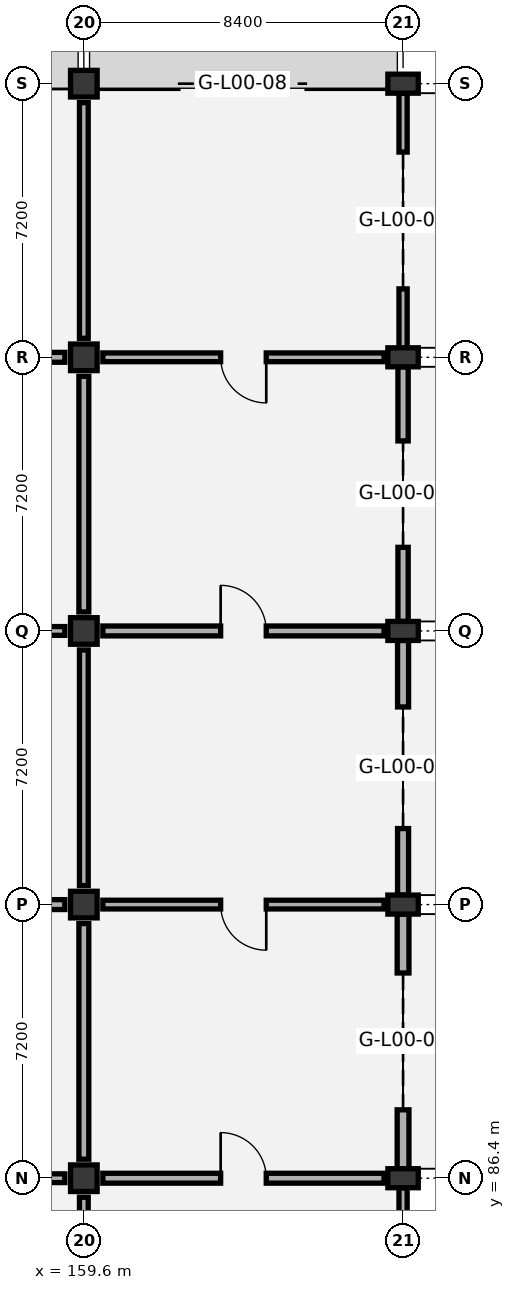
"""IFC4 building model, lengths in metres.
Left out: names, types, materials, properties, quantities, classifications, styles, units other than length and angle.
Written with IfcOpenShell. Run it as: python <this file> out.ifc"""

import sys

from ifc_helpers import new_model, si_unit, direction, frame, frame_2d, origin, origin_2d, place, context, subcontext, project, spatial, rectangle, extrude, element, fill, save


model = new_model("IFC4")
c1 = context("Model", 3, precision=1e-05, world=origin(), true_north=direction((0.0, 1.0)))
c2 = subcontext(c1, "Body", "Model", "MODEL_VIEW")
j1 = project(units=[si_unit("LENGTHUNIT", "METRE"), si_unit("PLANEANGLEUNIT", "RADIAN")], contexts=[c1])
p1 = place(None, origin())
s1 = spatial("IfcSite", under=j1, at=p1, CompositionType="ELEMENT")
p2 = place(p1, origin())
s2 = spatial("IfcBuilding", under=s1, at=p2, CompositionType="ELEMENT")
p3 = place(p2, origin())
s3 = spatial("IfcBuildingStorey", under=s2, at=p3, CompositionType="ELEMENT", Elevation=0.0)
for number, where, z_axis, x_axis in (
    (1, (159.6, 86.4, 0.0), (0.0, 0.0, 1.0), (1.0, 0.0, 0.0)),
    (2, (159.6, 93.6, 0.0), (0.0, 0.0, 1.0), (1.0, 0.0, 0.0)),
    (3, (159.6, 100.8, 0.0), (0.0, 0.0, 1.0), (1.0, 0.0, 0.0)),
    (4, (159.6, 108.0, 0.0), (0.0, 0.0, 1.0), (1.0, 0.0, 0.0)),
    (5, (159.6, 115.2, 0.0), (0.0, 0.0, 1.0), (1.0, 0.0, 0.0)),
):
    element("IfcColumn", number, at=place(p3, frame(where, z_axis=z_axis, x_axis=x_axis)), inside=s3, PredefinedType="COLUMN", context=c2, shape_type="SweptSolid", body=[
        extrude(rectangle(XDim=0.7, YDim=0.7, at=origin_2d()), origin(), (0.0, 0.0, 1.0), 6.0),
    ])
for number, where, z_axis, x_axis in (
    (6, (168.0, 86.4, 0.0), (0.0, 0.0, 1.0), (0.0, 1.0, 0.0)),
    (7, (168.0, 93.6, 0.0), (0.0, 0.0, 1.0), (0.0, 1.0, 0.0)),
    (8, (168.0, 100.8, 0.0), (0.0, 0.0, 1.0), (0.0, 1.0, 0.0)),
    (9, (168.0, 108.0, 0.0), (0.0, 0.0, 1.0), (0.0, 1.0, 0.0)),
    (10, (168.0, 115.2, 0.0), (0.0, 0.0, 1.0), (0.0, 1.0, 0.0)),
):
    element("IfcColumn", number, at=place(p3, frame(where, z_axis=z_axis, x_axis=x_axis)), inside=s3, PredefinedType="COLUMN", context=c2, shape_type="SweptSolid", body=[
        extrude(rectangle(XDim=0.5, YDim=0.8, at=origin_2d()), origin(), (0.0, 0.0, 1.0), 6.0),
    ])
p4 = place(p3, frame((151.55, 115.2, 0.0), z_axis=(0.0, 0.0, 1.0), x_axis=(1.0, 0.0, 0.0)))
e11 = element("IfcWall", 11, at=p4, inside=s3, PredefinedType="SOLIDWALL", context=c2, shape_type="SweptSolid", body=[
    extrude(rectangle(XDim=7.7, YDim=0.215, at=frame_2d((3.85, 0.0))), origin(), (0.0, 0.0, 1.0), 5.12),
])
p5 = place(p4, frame((2.15, 0.0, 0.0)))
e12 = element("IfcOpeningElement", 12, at=p5, cuts=e11, PredefinedType="OPENING", context=c2, shape_type="SweptSolid", body=[
    extrude(rectangle(XDim=3.4, YDim=3.4, at=frame_2d((1.7, 1.7))), frame((0.0, 0.117, 0.0), z_axis=(0.0, -1.0, 0.0), x_axis=(1.0, 0.0, 0.0)), (0.0, 0.0, 1.0), 0.235),
])
p6 = place(p3, frame((168.0, 79.45, 0.0), z_axis=(0.0, 0.0, 1.0), x_axis=(0.0, 1.0, 0.0)))
e13 = element("IfcWall", 13, at=p6, inside=s3, PredefinedType="SOLIDWALL", context=c2, shape_type="SweptSolid", body=[
    extrude(rectangle(XDim=6.7, YDim=0.215, at=frame_2d((3.35, 0.0))), origin(), (0.0, 0.0, 1.0), 5.02),
])
p7 = place(p6, frame((2.15, 0.0, 0.9)))
e14 = element("IfcOpeningElement", 14, at=p7, cuts=e13, PredefinedType="OPENING", context=c2, shape_type="SweptSolid", body=[
    extrude(rectangle(XDim=2.4, YDim=2.1, at=frame_2d((1.2, 1.05))), frame((0.0, 0.117, 0.0), z_axis=(0.0, -1.0, 0.0), x_axis=(1.0, 0.0, 0.0)), (0.0, 0.0, 1.0), 0.235),
])
p8 = place(p3, frame((168.0, 86.65, 0.0), z_axis=(0.0, 0.0, 1.0), x_axis=(0.0, 1.0, 0.0)))
e15 = element("IfcWall", 15, at=p8, inside=s3, PredefinedType="SOLIDWALL", context=c2, shape_type="SweptSolid", body=[
    extrude(rectangle(XDim=6.7, YDim=0.31, at=frame_2d((3.35, 0.0))), origin(), (0.0, 0.0, 1.0), 5.02),
])
p9 = place(p8, frame((1.55, 0.0, 0.0)))
e16 = element("IfcOpeningElement", 16, at=p9, cuts=e15, PredefinedType="OPENING", context=c2, shape_type="SweptSolid", body=[
    extrude(rectangle(XDim=3.6, YDim=3.6, at=frame_2d((1.8, 1.8))), frame((0.0, 0.165, 0.0), z_axis=(0.0, -1.0, 0.0), x_axis=(1.0, 0.0, 0.0)), (0.0, 0.0, 1.0), 0.33),
])
p10 = place(p3, frame((168.0, 93.85, 0.0), z_axis=(0.0, 0.0, 1.0), x_axis=(0.0, 1.0, 0.0)))
e17 = element("IfcWall", 17, at=p10, inside=s3, PredefinedType="SOLIDWALL", context=c2, shape_type="SweptSolid", body=[
    extrude(rectangle(XDim=6.7, YDim=0.29, at=frame_2d((3.35, 0.0))), origin(), (0.0, 0.0, 1.0), 5.12),
])
p11 = place(p10, frame((1.75, 0.0, 0.0)))
e18 = element("IfcOpeningElement", 18, at=p11, cuts=e17, PredefinedType="OPENING", context=c2, shape_type="SweptSolid", body=[
    extrude(rectangle(XDim=3.2, YDim=3.2, at=frame_2d((1.6, 1.6))), frame((0.0, 0.155, 0.0), z_axis=(0.0, -1.0, 0.0), x_axis=(1.0, 0.0, 0.0)), (0.0, 0.0, 1.0), 0.31),
])
p12 = place(p3, frame((168.0, 101.05, 0.0), z_axis=(0.0, 0.0, 1.0), x_axis=(0.0, 1.0, 0.0)))
e19 = element("IfcWall", 19, at=p12, inside=s3, PredefinedType="SOLIDWALL", context=c2, shape_type="SweptSolid", body=[
    extrude(rectangle(XDim=6.7, YDim=0.27, at=frame_2d((3.35, 0.0))), origin(), (0.0, 0.0, 1.0), 5.12),
])
p13 = place(p12, frame((1.95, 0.0, 0.0)))
e20 = element("IfcOpeningElement", 20, at=p13, cuts=e19, PredefinedType="OPENING", context=c2, shape_type="SweptSolid", body=[
    extrude(rectangle(XDim=2.8, YDim=3.0, at=frame_2d((1.4, 1.5))), frame((0.0, 0.145, 0.0), z_axis=(0.0, -1.0, 0.0), x_axis=(1.0, 0.0, 0.0)), (0.0, 0.0, 1.0), 0.29),
])
p14 = place(p3, frame((159.95, 115.2, 0.0), z_axis=(0.0, 0.0, 1.0), x_axis=(1.0, 0.0, 0.0)))
e21 = element("IfcWall", 21, at=p14, inside=s3, PredefinedType="SOLIDWALL", context=c2, shape_type="SweptSolid", body=[
    extrude(rectangle(XDim=7.65, YDim=0.25, at=frame_2d((3.825, 0.0))), origin(), (0.0, 0.0, 1.0), 5.12),
])
p15 = place(p14, frame((2.125, 0.0, 0.0)))
e22 = element("IfcOpeningElement", 22, at=p15, cuts=e21, PredefinedType="OPENING", context=c2, shape_type="SweptSolid", body=[
    extrude(rectangle(XDim=3.4, YDim=3.4, at=frame_2d((1.7, 1.7))), frame((0.0, 0.135, 0.0), z_axis=(0.0, -1.0, 0.0), x_axis=(1.0, 0.0, 0.0)), (0.0, 0.0, 1.0), 0.27),
])
p16 = place(p3, frame((168.0, 108.25, 0.0), z_axis=(0.0, 0.0, 1.0), x_axis=(0.0, 1.0, 0.0)))
e23 = element("IfcWall", 23, at=p16, inside=s3, PredefinedType="SOLIDWALL", context=c2, shape_type="SweptSolid", body=[
    extrude(rectangle(XDim=6.7, YDim=0.215, at=frame_2d((3.35, 0.0))), origin(), (0.0, 0.0, 1.0), 5.12),
])
p17 = place(p16, frame((1.55, 0.0, 0.0)))
e24 = element("IfcOpeningElement", 24, at=p17, cuts=e23, PredefinedType="OPENING", context=c2, shape_type="SweptSolid", body=[
    extrude(rectangle(XDim=3.6, YDim=3.6, at=frame_2d((1.8, 1.8))), frame((0.0, 0.117, 0.0), z_axis=(0.0, -1.0, 0.0), x_axis=(1.0, 0.0, 0.0)), (0.0, 0.0, 1.0), 0.235),
])
p18 = place(p3, frame((159.6, 79.7, 0.0), z_axis=(0.0, 0.0, 1.0), x_axis=(0.0, 1.0, 0.0)))
e25 = element("IfcWall", 25, at=p18, inside=s3, PredefinedType="PARTITIONING", context=c2, shape_type="SweptSolid", body=[
    extrude(rectangle(XDim=6.2, YDim=0.23, at=frame_2d((3.1, 0.0))), origin(), (0.0, 0.0, 1.0), 5.27),
])
p19 = place(p18, frame((2.5, 0.0, 0.0)))
e26 = element("IfcOpeningElement", 26, at=p19, cuts=e25, PredefinedType="OPENING", context=c2, shape_type="SweptSolid", body=[
    extrude(rectangle(XDim=1.2, YDim=2.1, at=frame_2d((0.6, 1.05))), frame((0.0, 0.125, 0.0), z_axis=(0.0, -1.0, 0.0), x_axis=(1.0, 0.0, 0.0)), (0.0, 0.0, 1.0), 0.25),
])
p20 = place(p3, frame((151.7, 86.4, 0.0), z_axis=(0.0, 0.0, 1.0), x_axis=(1.0, 0.0, 0.0)))
e27 = element("IfcWall", 27, at=p20, inside=s3, PredefinedType="PARTITIONING", context=c2, shape_type="SweptSolid", body=[
    extrude(rectangle(XDim=7.4, YDim=0.23, at=frame_2d((3.7, 0.0))), origin(), (0.0, 0.0, 1.0), 4.87),
])
p21 = place(p20, frame((3.1, 0.0, 0.0)))
e28 = element("IfcOpeningElement", 28, at=p21, cuts=e27, PredefinedType="OPENING", context=c2, shape_type="SweptSolid", body=[
    extrude(rectangle(XDim=1.2, YDim=2.1, at=frame_2d((0.6, 1.05))), frame((0.0, 0.125, 0.0), z_axis=(0.0, -1.0, 0.0), x_axis=(1.0, 0.0, 0.0)), (0.0, 0.0, 1.0), 0.25),
])
p22 = place(p3, frame((159.6, 86.9, 0.0), z_axis=(0.0, 0.0, 1.0), x_axis=(0.0, 1.0, 0.0)))
e29 = element("IfcWall", 29, at=p22, inside=s3, PredefinedType="PARTITIONING", context=c2, shape_type="SweptSolid", body=[
    extrude(rectangle(XDim=6.2, YDim=0.26, at=frame_2d((3.1, 0.0))), origin(), (0.0, 0.0, 1.0), 4.92),
])
p23 = place(p3, frame((151.7, 93.6, 0.0), z_axis=(0.0, 0.0, 1.0), x_axis=(1.0, 0.0, 0.0)))
e30 = element("IfcWall", 30, at=p23, inside=s3, PredefinedType="PARTITIONING", context=c2, shape_type="SweptSolid", body=[
    extrude(rectangle(XDim=7.4, YDim=0.26, at=frame_2d((3.7, 0.0))), origin(), (0.0, 0.0, 1.0), 4.87),
])
p24 = place(p23, frame((3.1, 0.0, 0.0)))
e31 = element("IfcOpeningElement", 31, at=p24, cuts=e30, PredefinedType="OPENING", context=c2, shape_type="SweptSolid", body=[
    extrude(rectangle(XDim=1.2, YDim=2.1, at=frame_2d((0.6, 1.05))), frame((0.0, 0.14, 0.0), z_axis=(0.0, -1.0, 0.0), x_axis=(1.0, 0.0, 0.0)), (0.0, 0.0, 1.0), 0.28),
])
p25 = place(p3, frame((159.6, 94.1, 0.0), z_axis=(0.0, 0.0, 1.0), x_axis=(0.0, 1.0, 0.0)))
e32 = element("IfcWall", 32, at=p25, inside=s3, PredefinedType="PARTITIONING", context=c2, shape_type="SweptSolid", body=[
    extrude(rectangle(XDim=6.2, YDim=0.23, at=frame_2d((3.1, 0.0))), origin(), (0.0, 0.0, 1.0), 5.48),
])
p26 = place(p3, frame((151.7, 100.8, 0.0), z_axis=(0.0, 0.0, 1.0), x_axis=(1.0, 0.0, 0.0)))
e33 = element("IfcWall", 33, at=p26, inside=s3, PredefinedType="PARTITIONING", context=c2, shape_type="SweptSolid", body=[
    extrude(rectangle(XDim=7.4, YDim=0.23, at=frame_2d((3.7, 0.0))), origin(), (0.0, 0.0, 1.0), 4.97),
])
p27 = place(p26, frame((3.1, 0.0, 0.0)))
e34 = element("IfcOpeningElement", 34, at=p27, cuts=e33, PredefinedType="OPENING", context=c2, shape_type="SweptSolid", body=[
    extrude(rectangle(XDim=1.2, YDim=2.1, at=frame_2d((0.6, 1.05))), frame((0.0, 0.125, 0.0), z_axis=(0.0, -1.0, 0.0), x_axis=(1.0, 0.0, 0.0)), (0.0, 0.0, 1.0), 0.25),
])
p28 = place(p3, frame((159.6, 101.3, 0.0), z_axis=(0.0, 0.0, 1.0), x_axis=(0.0, 1.0, 0.0)))
e35 = element("IfcWall", 35, at=p28, inside=s3, PredefinedType="PARTITIONING", context=c2, shape_type="SweptSolid", body=[
    extrude(rectangle(XDim=6.2, YDim=0.26, at=frame_2d((3.1, 0.0))), origin(), (0.0, 0.0, 1.0), 5.02),
])
p29 = place(p3, frame((151.7, 108.0, 0.0), z_axis=(0.0, 0.0, 1.0), x_axis=(1.0, 0.0, 0.0)))
e36 = element("IfcWall", 36, at=p29, inside=s3, PredefinedType="PARTITIONING", context=c2, shape_type="SweptSolid", body=[
    extrude(rectangle(XDim=7.4, YDim=0.26, at=frame_2d((3.7, 0.0))), origin(), (0.0, 0.0, 1.0), 4.97),
])
p30 = place(p29, frame((3.1, 0.0, 0.0)))
e37 = element("IfcOpeningElement", 37, at=p30, cuts=e36, PredefinedType="OPENING", context=c2, shape_type="SweptSolid", body=[
    extrude(rectangle(XDim=1.2, YDim=2.1, at=frame_2d((0.6, 1.05))), frame((0.0, 0.14, 0.0), z_axis=(0.0, -1.0, 0.0), x_axis=(1.0, 0.0, 0.0)), (0.0, 0.0, 1.0), 0.28),
])
p31 = place(p3, frame((159.6, 108.5, 0.0), z_axis=(0.0, 0.0, 1.0), x_axis=(0.0, 1.0, 0.0)))
e38 = element("IfcWall", 38, at=p31, inside=s3, PredefinedType="PARTITIONING", context=c2, shape_type="SweptSolid", body=[
    extrude(rectangle(XDim=6.2, YDim=0.23, at=frame_2d((3.1, 0.0))), origin(), (0.0, 0.0, 1.0), 5.27),
])
p32 = place(p3, frame((160.1, 86.4, 0.0), z_axis=(0.0, 0.0, 1.0), x_axis=(1.0, 0.0, 0.0)))
e39 = element("IfcWall", 39, at=p32, inside=s3, PredefinedType="PARTITIONING", context=c2, shape_type="SweptSolid", body=[
    extrude(rectangle(XDim=7.4, YDim=0.26, at=frame_2d((3.7, 0.0))), origin(), (0.0, 0.0, 1.0), 4.87),
])
p33 = place(p32, frame((3.1, 0.0, 0.0)))
e40 = element("IfcOpeningElement", 40, at=p33, cuts=e39, PredefinedType="OPENING", context=c2, shape_type="SweptSolid", body=[
    extrude(rectangle(XDim=1.2, YDim=2.1, at=frame_2d((0.6, 1.05))), frame((0.0, 0.14, 0.0), z_axis=(0.0, -1.0, 0.0), x_axis=(1.0, 0.0, 0.0)), (0.0, 0.0, 1.0), 0.28),
])
p34 = place(p3, frame((160.1, 93.6, 0.0), z_axis=(0.0, 0.0, 1.0), x_axis=(1.0, 0.0, 0.0)))
e41 = element("IfcWall", 41, at=p34, inside=s3, PredefinedType="PARTITIONING", context=c2, shape_type="SweptSolid", body=[
    extrude(rectangle(XDim=7.4, YDim=0.23, at=frame_2d((3.7, 0.0))), origin(), (0.0, 0.0, 1.0), 4.87),
])
p35 = place(p34, frame((3.1, 0.0, 0.0)))
e42 = element("IfcOpeningElement", 42, at=p35, cuts=e41, PredefinedType="OPENING", context=c2, shape_type="SweptSolid", body=[
    extrude(rectangle(XDim=1.2, YDim=2.1, at=frame_2d((0.6, 1.05))), frame((0.0, 0.125, 0.0), z_axis=(0.0, -1.0, 0.0), x_axis=(1.0, 0.0, 0.0)), (0.0, 0.0, 1.0), 0.25),
])
p36 = place(p3, frame((160.1, 100.8, 0.0), z_axis=(0.0, 0.0, 1.0), x_axis=(1.0, 0.0, 0.0)))
e43 = element("IfcWall", 43, at=p36, inside=s3, PredefinedType="PARTITIONING", context=c2, shape_type="SweptSolid", body=[
    extrude(rectangle(XDim=7.4, YDim=0.26, at=frame_2d((3.7, 0.0))), origin(), (0.0, 0.0, 1.0), 4.97),
])
p37 = place(p36, frame((3.1, 0.0, 0.0)))
e44 = element("IfcOpeningElement", 44, at=p37, cuts=e43, PredefinedType="OPENING", context=c2, shape_type="SweptSolid", body=[
    extrude(rectangle(XDim=1.2, YDim=2.1, at=frame_2d((0.6, 1.05))), frame((0.0, 0.14, 0.0), z_axis=(0.0, -1.0, 0.0), x_axis=(1.0, 0.0, 0.0)), (0.0, 0.0, 1.0), 0.28),
])
p38 = place(p3, frame((160.1, 108.0, 0.0), z_axis=(0.0, 0.0, 1.0), x_axis=(1.0, 0.0, 0.0)))
e45 = element("IfcWall", 45, at=p38, inside=s3, PredefinedType="PARTITIONING", context=c2, shape_type="SweptSolid", body=[
    extrude(rectangle(XDim=7.4, YDim=0.23, at=frame_2d((3.7, 0.0))), origin(), (0.0, 0.0, 1.0), 4.97),
])
p39 = place(p38, frame((3.1, 0.0, 0.0)))
e46 = element("IfcOpeningElement", 46, at=p39, cuts=e45, PredefinedType="OPENING", context=c2, shape_type="SweptSolid", body=[
    extrude(rectangle(XDim=1.2, YDim=2.1, at=frame_2d((0.6, 1.05))), frame((0.0, 0.125, 0.0), z_axis=(0.0, -1.0, 0.0), x_axis=(1.0, 0.0, 0.0)), (0.0, 0.0, 1.0), 0.25),
])
p40 = place(p9, frame((3.6, 0.0, 0.0), z_axis=(0.0, 0.0, 1.0), x_axis=(-1.0, 0.0, 0.0)))
e47 = element("IfcDoor", 47, at=p40, inside=s3, OperationType="ROLLINGUP", PredefinedType="GATE", context=c2, shape_type="SweptSolid", body=[
    extrude(rectangle(XDim=3.6, YDim=3.6, at=frame_2d((1.8, 1.8))), frame((0.0, 0.025, 0.0), z_axis=(0.0, -1.0, 0.0), x_axis=(1.0, 0.0, 0.0)), (0.0, 0.0, 1.0), 0.05),
])
fill(e16, e47)
p41 = place(p11, frame((3.2, 0.0, 0.0), z_axis=(0.0, 0.0, 1.0), x_axis=(-1.0, 0.0, 0.0)))
e48 = element("IfcDoor", 48, at=p41, inside=s3, OperationType="ROLLINGUP", PredefinedType="GATE", context=c2, shape_type="SweptSolid", body=[
    extrude(rectangle(XDim=3.2, YDim=3.2, at=frame_2d((1.6, 1.6))), frame((0.0, 0.025, 0.0), z_axis=(0.0, -1.0, 0.0), x_axis=(1.0, 0.0, 0.0)), (0.0, 0.0, 1.0), 0.05),
])
fill(e18, e48)
p42 = place(p13, frame((2.8, 0.0, 0.0), z_axis=(0.0, 0.0, 1.0), x_axis=(-1.0, 0.0, 0.0)))
e49 = element("IfcDoor", 49, at=p42, inside=s3, OperationType="ROLLINGUP", PredefinedType="GATE", context=c2, shape_type="SweptSolid", body=[
    extrude(rectangle(XDim=2.8, YDim=3.0, at=frame_2d((1.4, 1.5))), frame((0.0, 0.025, 0.0), z_axis=(0.0, -1.0, 0.0), x_axis=(1.0, 0.0, 0.0)), (0.0, 0.0, 1.0), 0.05),
])
fill(e20, e49)
p43 = place(p15, origin())
e50 = element("IfcDoor", 50, at=p43, inside=s3, OperationType="ROLLINGUP", PredefinedType="GATE", context=c2, shape_type="SweptSolid", body=[
    extrude(rectangle(XDim=3.4, YDim=3.4, at=frame_2d((1.7, 1.7))), frame((0.0, 0.025, 0.0), z_axis=(0.0, -1.0, 0.0), x_axis=(1.0, 0.0, 0.0)), (0.0, 0.0, 1.0), 0.05),
])
fill(e22, e50)
p44 = place(p17, frame((3.6, 0.0, 0.0), z_axis=(0.0, 0.0, 1.0), x_axis=(-1.0, 0.0, 0.0)))
e51 = element("IfcDoor", 51, at=p44, inside=s3, OperationType="ROLLINGUP", PredefinedType="GATE", context=c2, shape_type="SweptSolid", body=[
    extrude(rectangle(XDim=3.6, YDim=3.6, at=frame_2d((1.8, 1.8))), frame((0.0, 0.025, 0.0), z_axis=(0.0, -1.0, 0.0), x_axis=(1.0, 0.0, 0.0)), (0.0, 0.0, 1.0), 0.05),
])
fill(e24, e51)
p45 = place(p33, origin())
e52 = element("IfcDoor", 52, at=p45, inside=s3, OperationType="SINGLE_SWING_LEFT", PredefinedType="DOOR", context=c2, shape_type="SweptSolid", body=[
    extrude(rectangle(XDim=1.2, YDim=2.1, at=frame_2d((0.6, 1.05))), frame((0.0, 0.025, 0.0), z_axis=(0.0, -1.0, 0.0), x_axis=(1.0, 0.0, 0.0)), (0.0, 0.0, 1.0), 0.05),
])
fill(e40, e52)
p46 = place(p35, frame((1.2, 0.0, 0.0), z_axis=(0.0, 0.0, 1.0), x_axis=(-1.0, 0.0, 0.0)))
e53 = element("IfcDoor", 53, at=p46, inside=s3, OperationType="SINGLE_SWING_LEFT", PredefinedType="DOOR", context=c2, shape_type="SweptSolid", body=[
    extrude(rectangle(XDim=1.2, YDim=2.1, at=frame_2d((0.6, 1.05))), frame((0.0, 0.025, 0.0), z_axis=(0.0, -1.0, 0.0), x_axis=(1.0, 0.0, 0.0)), (0.0, 0.0, 1.0), 0.05),
])
fill(e42, e53)
p47 = place(p37, origin())
e54 = element("IfcDoor", 54, at=p47, inside=s3, OperationType="SINGLE_SWING_LEFT", PredefinedType="DOOR", context=c2, shape_type="SweptSolid", body=[
    extrude(rectangle(XDim=1.2, YDim=2.1, at=frame_2d((0.6, 1.05))), frame((0.0, 0.025, 0.0), z_axis=(0.0, -1.0, 0.0), x_axis=(1.0, 0.0, 0.0)), (0.0, 0.0, 1.0), 0.05),
])
fill(e44, e54)
p48 = place(p39, frame((1.2, 0.0, 0.0), z_axis=(0.0, 0.0, 1.0), x_axis=(-1.0, 0.0, 0.0)))
e55 = element("IfcDoor", 55, at=p48, inside=s3, OperationType="SINGLE_SWING_LEFT", PredefinedType="DOOR", context=c2, shape_type="SweptSolid", body=[
    extrude(rectangle(XDim=1.2, YDim=2.1, at=frame_2d((0.6, 1.05))), frame((0.0, 0.025, 0.0), z_axis=(0.0, -1.0, 0.0), x_axis=(1.0, 0.0, 0.0)), (0.0, 0.0, 1.0), 0.05),
])
fill(e46, e55)
save(model, sys.argv[1])
